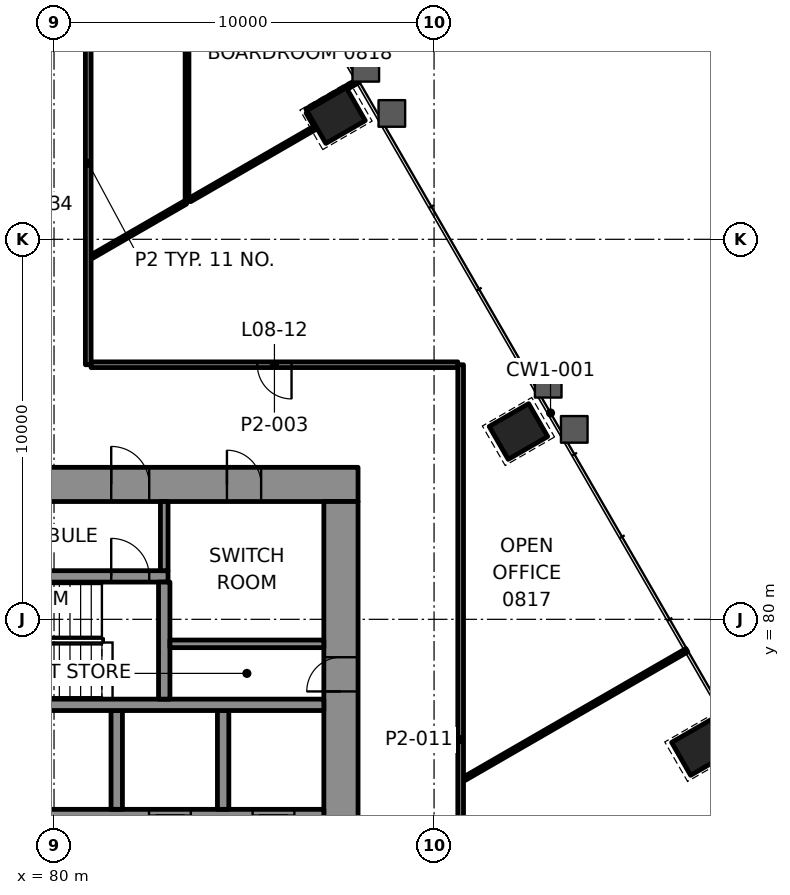
"""IFC4 building model, lengths in metres.
Left out: names, types, materials, properties, quantities, classifications, styles, units other than length and angle.
Written with IfcOpenShell. Run it as: python <this file> out.ifc"""

import sys

from ifc_helpers import new_model, si_unit, direction, frame, frame_2d, origin, origin_2d, place, context, subcontext, project, spatial, rectangle, extrude, element, fill, save


model = new_model("IFC4")
c1 = context("Model", 3, precision=1e-05, world=origin(), true_north=direction((0.0, 1.0)))
c2 = subcontext(c1, "Body", "Model", "MODEL_VIEW")
j1 = project(units=[si_unit("LENGTHUNIT", "METRE"), si_unit("PLANEANGLEUNIT", "RADIAN")], contexts=[c1])
p1 = place(None, origin())
s1 = spatial("IfcSite", under=j1, at=p1, CompositionType="ELEMENT")
p2 = place(p1, origin())
s2 = spatial("IfcBuilding", under=s1, at=p2, CompositionType="ELEMENT")
p3 = place(p2, frame((0.0, 0.0, 40.0)))
s3 = spatial("IfcBuildingStorey", under=s2, at=p3, CompositionType="ELEMENT", Elevation=40.0)
for number, where, z_axis, x_axis in (
    (1, (97.021, 76.628, -0.0), (0.0, 0.0, 1.0), (-0.5, 0.866, 0.0)),
    (2, (92.22, 84.942, -0.0), (0.0, 0.0, 1.0), (-0.5, 0.866, 0.0)),
    (3, (87.421, 93.256, -0.0), (0.0, 0.0, 1.0), (-0.5, 0.866, 0.0)),
):
    element("IfcColumn", number, at=place(p3, frame(where, z_axis=z_axis, x_axis=x_axis)), inside=s3, PredefinedType="COLUMN", context=c2, shape_type="SweptSolid", body=[
        extrude(rectangle(XDim=1.0, YDim=1.2, at=origin_2d()), origin(), (0.0, 0.0, 1.0), 4.2),
    ])
p4 = place(p3, frame((62.0, 83.55, 0.0), z_axis=(0.0, 0.0, 1.0), x_axis=(1.0, 0.0, 0.0)))
e4 = element("IfcWall", 4, at=p4, inside=s3, PredefinedType="SHEAR", context=c2, shape_type="SweptSolid", body=[
    extrude(rectangle(XDim=26.0, YDim=0.9, at=frame_2d((13.0, 0.0))), origin(), (0.0, 0.0, 1.0), 4.0),
])
p5 = place(p4, frame((5.695, 0.0, 0.0)))
e5 = element("IfcOpeningElement", 5, at=p5, cuts=e4, PredefinedType="OPENING", context=c2, shape_type="SweptSolid", body=[
    extrude(rectangle(XDim=1.0, YDim=2.1, at=frame_2d((0.5, 1.05))), frame((0.0, 0.46, 0.0), z_axis=(0.0, -1.0, 0.0), x_axis=(1.0, 0.0, 0.0)), (0.0, 0.0, 1.0), 0.92),
])
p6 = place(p4, frame((19.505, 0.0, 0.0)))
e6 = element("IfcOpeningElement", 6, at=p6, cuts=e4, PredefinedType="OPENING", context=c2, shape_type="SweptSolid", body=[
    extrude(rectangle(XDim=1.0, YDim=2.1, at=frame_2d((0.5, 1.05))), frame((0.0, 0.46, 0.0), z_axis=(0.0, -1.0, 0.0), x_axis=(1.0, 0.0, 0.0)), (0.0, 0.0, 1.0), 0.92),
])
p7 = place(p4, frame((3.45, 0.0, 0.0)))
e7 = element("IfcOpeningElement", 7, at=p7, cuts=e4, PredefinedType="OPENING", context=c2, shape_type="SweptSolid", body=[
    extrude(rectangle(XDim=0.9, YDim=2.1, at=frame_2d((0.45, 1.05))), frame((0.0, 0.46, 0.0), z_axis=(0.0, -1.0, 0.0), x_axis=(1.0, 0.0, 0.0)), (0.0, 0.0, 1.0), 0.92),
])
p8 = place(p4, frame((12.65, 0.0, 0.0)))
e8 = element("IfcOpeningElement", 8, at=p8, cuts=e4, PredefinedType="OPENING", context=c2, shape_type="SweptSolid", body=[
    extrude(rectangle(XDim=0.9, YDim=2.1, at=frame_2d((0.45, 1.05))), frame((0.0, 0.46, 0.0), z_axis=(0.0, -1.0, 0.0), x_axis=(1.0, 0.0, 0.0)), (0.0, 0.0, 1.0), 0.92),
])
p9 = place(p4, frame((22.55, 0.0, 0.0)))
e9 = element("IfcOpeningElement", 9, at=p9, cuts=e4, PredefinedType="OPENING", context=c2, shape_type="SweptSolid", body=[
    extrude(rectangle(XDim=0.9, YDim=2.1, at=frame_2d((0.45, 1.05))), frame((0.0, 0.46, 0.0), z_axis=(0.0, -1.0, 0.0), x_axis=(1.0, 0.0, 0.0)), (0.0, 0.0, 1.0), 0.92),
])
p10 = place(p3, frame((87.55, 66.9, 0.0), z_axis=(0.0, 0.0, 1.0), x_axis=(0.0, 1.0, 0.0)))
e10 = element("IfcWall", 10, at=p10, inside=s3, PredefinedType="SHEAR", context=c2, shape_type="SweptSolid", body=[
    extrude(rectangle(XDim=16.2, YDim=0.9, at=frame_2d((8.1, 0.0))), origin(), (0.0, 0.0, 1.0), 4.0),
])
p11 = place(p10, frame((5.5, 0.0, 0.0)))
e11 = element("IfcOpeningElement", 11, at=p11, cuts=e10, PredefinedType="OPENING", context=c2, shape_type="SweptSolid", body=[
    extrude(rectangle(XDim=1.8, YDim=2.1, at=frame_2d((0.9, 1.05))), frame((0.0, 0.46, 0.0), z_axis=(0.0, -1.0, 0.0), x_axis=(1.0, 0.0, 0.0)), (0.0, 0.0, 1.0), 0.92),
])
p12 = place(p10, frame((11.202, 0.0, 0.0)))
e12 = element("IfcOpeningElement", 12, at=p12, cuts=e10, PredefinedType="OPENING", context=c2, shape_type="SweptSolid", body=[
    extrude(rectangle(XDim=0.9, YDim=2.1, at=frame_2d((0.45, 1.05))), frame((0.0, 0.46, 0.0), z_axis=(0.0, -1.0, 0.0), x_axis=(1.0, 0.0, 0.0)), (0.0, 0.0, 1.0), 0.92),
])
p13 = place(p3, frame((70.3, 74.85, 0.0), z_axis=(0.0, 0.0, 1.0), x_axis=(1.0, 0.0, 0.0)))
e13 = element("IfcWall", 13, at=p13, inside=s3, PredefinedType="SHEAR", context=c2, shape_type="SweptSolid", body=[
    extrude(rectangle(XDim=16.8, YDim=0.3, at=frame_2d((8.4, 0.0))), origin(), (0.0, 0.0, 1.0), 4.0),
])
p14 = place(p13, frame((3.8, 0.0, 0.0)))
e14 = element("IfcOpeningElement", 14, at=p14, cuts=e13, PredefinedType="OPENING", context=c2, shape_type="SweptSolid", body=[
    extrude(rectangle(XDim=1.1, YDim=2.1, at=frame_2d((0.55, 1.05))), frame((0.0, 0.16, 0.0), z_axis=(0.0, -1.0, 0.0), x_axis=(1.0, 0.0, 0.0)), (0.0, 0.0, 1.0), 0.32),
])
p15 = place(p13, frame((12.2, 0.0, 0.0)))
e15 = element("IfcOpeningElement", 15, at=p15, cuts=e13, PredefinedType="OPENING", context=c2, shape_type="SweptSolid", body=[
    extrude(rectangle(XDim=1.1, YDim=2.1, at=frame_2d((0.55, 1.05))), frame((0.0, 0.16, 0.0), z_axis=(0.0, -1.0, 0.0), x_axis=(1.0, 0.0, 0.0)), (0.0, 0.0, 1.0), 0.32),
])
p16 = place(p13, frame((14.925, 0.0, 0.0)))
e16 = element("IfcOpeningElement", 16, at=p16, cuts=e13, PredefinedType="OPENING", context=c2, shape_type="SweptSolid", body=[
    extrude(rectangle(XDim=1.1, YDim=2.1, at=frame_2d((0.55, 1.05))), frame((0.0, 0.16, 0.0), z_axis=(0.0, -1.0, 0.0), x_axis=(1.0, 0.0, 0.0)), (0.0, 0.0, 1.0), 0.32),
])
for number, where, z_axis, x_axis in (
    (17, (81.65, 75.0, 0.0), (0.0, 0.0, 1.0), (0.0, 1.0, 0.0)),
    (18, (84.45, 75.0, 0.0), (0.0, 0.0, 1.0), (0.0, 1.0, 0.0)),
):
    element("IfcWall", number, at=place(p3, frame(where, z_axis=z_axis, x_axis=x_axis)), inside=s3, PredefinedType="SHEAR", context=c2, shape_type="SweptSolid", body=[
        extrude(rectangle(XDim=2.6, YDim=0.3, at=frame_2d((1.3, 0.0))), origin(), (0.0, 0.0, 1.0), 4.0),
    ])
p17 = place(p3, frame((64.35, 77.75, 0.0), z_axis=(0.0, 0.0, 1.0), x_axis=(1.0, 0.0, 0.0)))
e19 = element("IfcWall", 19, at=p17, inside=s3, PredefinedType="SHEAR", context=c2, shape_type="SweptSolid", body=[
    extrude(rectangle(XDim=22.75, YDim=0.3, at=frame_2d((11.375, 0.0))), origin(), (0.0, 0.0, 1.0), 4.0),
])
p18 = place(p17, frame((3.345, 0.0, 0.0)))
e20 = element("IfcOpeningElement", 20, at=p18, cuts=e19, PredefinedType="OPENING", context=c2, shape_type="SweptSolid", body=[
    extrude(rectangle(XDim=1.0, YDim=2.1, at=frame_2d((0.5, 1.05))), frame((0.0, 0.16, 0.0), z_axis=(0.0, -1.0, 0.0), x_axis=(1.0, 0.0, 0.0)), (0.0, 0.0, 1.0), 0.32),
])
p19 = place(p3, frame((76.14, 81.13, 0.0), z_axis=(0.0, 0.0, 1.0), x_axis=(1.0, 0.0, 0.0)))
e21 = element("IfcWall", 21, at=p19, inside=s3, PredefinedType="SHEAR", context=c2, shape_type="SweptSolid", body=[
    extrude(rectangle(XDim=6.86, YDim=0.3, at=frame_2d((3.43, 0.0))), origin(), (0.0, 0.0, 1.0), 4.0),
])
p20 = place(p19, frame((5.365, 0.0, 0.0)))
e22 = element("IfcOpeningElement", 22, at=p20, cuts=e21, PredefinedType="OPENING", context=c2, shape_type="SweptSolid", body=[
    extrude(rectangle(XDim=1.0, YDim=2.1, at=frame_2d((0.5, 1.05))), frame((0.0, 0.16, 0.0), z_axis=(0.0, -1.0, 0.0), x_axis=(1.0, 0.0, 0.0)), (0.0, 0.0, 1.0), 0.32),
])
p21 = place(p3, frame((82.9, 77.9, 0.0), z_axis=(0.0, 0.0, 1.0), x_axis=(0.0, 1.0, 0.0)))
e23 = element("IfcWall", 23, at=p21, inside=s3, PredefinedType="SHEAR", context=c2, shape_type="SweptSolid", body=[
    extrude(rectangle(XDim=3.08, YDim=0.3, at=frame_2d((1.54, 0.0))), origin(), (0.0, 0.0, 1.0), 4.0),
])
p22 = place(p3, frame((90.625, 86.7, 0.0), z_axis=(0.0, 0.0, 1.0), x_axis=(-1.0, 0.0, 0.0)))
e24 = element("IfcWall", 24, at=p22, inside=s3, PredefinedType="PARTITIONING", context=c2, shape_type="SweptSolid", body=[
    extrude(rectangle(XDim=9.649, YDim=0.15, at=frame_2d((4.825, 0.0))), origin(), (0.0, 0.0, 1.0), 3.4),
])
p23 = place(p22, frame((4.375, 0.0, 0.0)))
e25 = element("IfcOpeningElement", 25, at=p23, cuts=e24, PredefinedType="OPENING", context=c2, shape_type="SweptSolid", body=[
    extrude(rectangle(XDim=0.9, YDim=2.1, at=frame_2d((0.45, 1.05))), frame((0.0, 0.085, 0.0), z_axis=(0.0, -1.0, 0.0), x_axis=(1.0, 0.0, 0.0)), (0.0, 0.0, 1.0), 0.17),
])
p24 = place(p3, frame((90.801, 75.809, 0.0), z_axis=(0.0, 0.0, 1.0), x_axis=(0.866012872937, 0.500021703436, 0.0)))
e26 = element("IfcWall", 26, at=p24, inside=s3, PredefinedType="PARTITIONING", context=c2, shape_type="SweptSolid", body=[
    extrude(rectangle(XDim=6.756, YDim=0.1, at=frame_2d((3.378, 0.0))), origin(), (0.0, 0.0, 1.0), 3.165),
])
p25 = place(p3, frame((81.001, 89.55, 0.0), z_axis=(0.0, 0.0, 1.0), x_axis=(0.866019653938, 0.500009958894, 0.0)))
e27 = element("IfcWall", 27, at=p25, inside=s3, PredefinedType="PARTITIONING", context=c2, shape_type="SweptSolid", body=[
    extrude(rectangle(XDim=2.842, YDim=0.1, at=frame_2d((1.421, 0.0))), origin(), (0.0, 0.0, 1.0), 3.4),
])
p26 = place(p3, frame((86.651, 93.389, 0.0), z_axis=(0.0, 0.0, 1.0), x_axis=(0.866018739521, 0.500011542666, 0.0)))
e28 = element("IfcWall", 28, at=p26, inside=s3, PredefinedType="PARTITIONING", context=c2, shape_type="SweptSolid", body=[
    extrude(rectangle(XDim=1.56, YDim=0.1, at=frame_2d((0.78, 0.0))), origin(), (0.0, 0.0, 1.0), 3.165),
])
p27 = place(p3, frame((90.7, 86.699, 0.0), z_axis=(0.0, 0.0, 1.0), x_axis=(0.0, -1.0, 0.0)))
e29 = element("IfcWall", 29, at=p27, inside=s3, PredefinedType="PARTITIONING", context=c2, shape_type="SweptSolid", body=[
    extrude(rectangle(XDim=19.725, YDim=0.15, at=frame_2d((9.862, 0.0))), origin(), (0.0, 0.0, 1.0), 3.4),
])
p28 = place(p27, frame((14.785, 0.0, 0.0)))
e30 = element("IfcOpeningElement", 30, at=p28, cuts=e29, PredefinedType="OPENING", context=c2, shape_type="SweptSolid", body=[
    extrude(rectangle(XDim=0.9, YDim=2.1, at=frame_2d((0.45, 1.05))), frame((0.0, 0.085, 0.0), z_axis=(0.0, -1.0, 0.0), x_axis=(1.0, 0.0, 0.0)), (0.0, 0.0, 1.0), 0.17),
])
p29 = place(p3, frame((83.5, 90.993, 0.0), z_axis=(0.0, 0.0, 1.0), x_axis=(0.0, 1.0, 0.0)))
e31 = element("IfcWall", 31, at=p29, inside=s3, PredefinedType="PARTITIONING", context=c2, shape_type="SweptSolid", body=[
    extrude(rectangle(XDim=8.907, YDim=0.1, at=frame_2d((4.454, 0.0))), origin(), (0.0, 0.0, 1.0), 3.165),
])
p30 = place(p3, frame((80.9, 86.7, 0.0), z_axis=(0.0, 0.0, 1.0), x_axis=(0.0, 1.0, 0.0)))
e32 = element("IfcWall", 32, at=p30, inside=s3, PredefinedType="PARTITIONING", context=c2, shape_type="SweptSolid", body=[
    extrude(rectangle(XDim=10.6, YDim=0.15, at=frame_2d((5.3, 0.0))), origin(), (0.0, 0.0, 1.0), 3.4),
])
p31 = place(p3, frame((86.876, 93.0, 0.0), z_axis=(0.0, 0.0, 1.0), x_axis=(-0.500409926597, 0.865788603161, 0.0)))
e33 = element("IfcWall", 33, at=p31, inside=s3, PredefinedType="PARTITIONING", context=c2, shape_type="SweptSolid", body=[
    extrude(rectangle(XDim=0.4, YDim=0.1, at=frame_2d((0.2, 0.0))), origin(), (0.0, 0.0, 1.0), 3.4),
])
p32 = place(p3, frame((83.575, 91.036, 0.0), z_axis=(0.0, 0.0, 1.0), x_axis=(0.866032607753, 0.499987522153, 0.0)))
e34 = element("IfcWall", 34, at=p32, inside=s3, PredefinedType="PARTITIONING", context=c2, shape_type="SweptSolid", body=[
    extrude(rectangle(XDim=3.8, YDim=0.1, at=frame_2d((1.9, 0.0))), origin(), (0.0, 0.0, 1.0), 3.4),
])
p33 = place(p3, frame((83.05, 79.355, 0.0), z_axis=(0.0, 0.0, 1.0), x_axis=(1.0, 0.0, 0.0)))
e35 = element("IfcWall", 35, at=p33, inside=s3, PredefinedType="PARTITIONING", context=c2, shape_type="SweptSolid", body=[
    extrude(rectangle(XDim=4.05, YDim=0.2, at=frame_2d((2.025, 0.0))), origin(), (0.0, 0.0, 1.0), 4.0),
])
p34 = place(p3, frame((82.9, 81.28, 0.0), z_axis=(0.0, 0.0, 1.0), x_axis=(0.0, 1.0, 0.0)))
e36 = element("IfcWall", 36, at=p34, inside=s3, PredefinedType="PARTITIONING", context=c2, shape_type="SweptSolid", body=[
    extrude(rectangle(XDim=1.82, YDim=0.2, at=frame_2d((0.91, 0.0))), origin(), (0.0, 0.0, 1.0), 4.0),
])
p35 = place(p23, origin())
e37 = element("IfcDoor", 37, at=p35, inside=s3, OperationType="SINGLE_SWING_LEFT", PredefinedType="DOOR", context=c2, shape_type="SweptSolid", body=[
    extrude(rectangle(XDim=0.9, YDim=2.1, at=frame_2d((0.45, 1.05))), frame((0.0, 0.025, 0.0), z_axis=(0.0, -1.0, 0.0), x_axis=(1.0, 0.0, 0.0)), (0.0, 0.0, 1.0), 0.05),
])
fill(e25, e37)
p36 = place(p15, origin())
e38 = element("IfcDoor", 38, at=p36, inside=s3, OperationType="DOUBLE_DOOR_SLIDING", PredefinedType="DOOR", context=c2, shape_type="SweptSolid", body=[
    extrude(rectangle(XDim=1.1, YDim=2.1, at=frame_2d((0.55, 1.05))), frame((0.0, 0.025, 0.0), z_axis=(0.0, -1.0, 0.0), x_axis=(1.0, 0.0, 0.0)), (0.0, 0.0, 1.0), 0.05),
])
fill(e15, e38)
p37 = place(p16, origin())
e39 = element("IfcDoor", 39, at=p37, inside=s3, OperationType="DOUBLE_DOOR_SLIDING", PredefinedType="DOOR", context=c2, shape_type="SweptSolid", body=[
    extrude(rectangle(XDim=1.1, YDim=2.1, at=frame_2d((0.55, 1.05))), frame((0.0, 0.025, 0.0), z_axis=(0.0, -1.0, 0.0), x_axis=(1.0, 0.0, 0.0)), (0.0, 0.0, 1.0), 0.05),
])
fill(e16, e39)
p38 = place(p20, origin())
e40 = element("IfcDoor", 40, at=p38, inside=s3, OperationType="SINGLE_SWING_RIGHT", PredefinedType="DOOR", context=c2, shape_type="SweptSolid", body=[
    extrude(rectangle(XDim=1.0, YDim=2.1, at=frame_2d((0.5, 1.05))), frame((0.0, 0.025, 0.0), z_axis=(0.0, -1.0, 0.0), x_axis=(1.0, 0.0, 0.0)), (0.0, 0.0, 1.0), 0.05),
])
fill(e22, e40)
p39 = place(p6, origin())
e41 = element("IfcDoor", 41, at=p39, inside=s3, OperationType="SINGLE_SWING_LEFT", PredefinedType="DOOR", context=c2, shape_type="SweptSolid", body=[
    extrude(rectangle(XDim=1.0, YDim=2.1, at=frame_2d((0.5, 1.05))), frame((0.0, 0.17, 0.0), z_axis=(0.0, -1.0, 0.0), x_axis=(1.0, 0.0, 0.0)), (0.0, 0.0, 1.0), 0.34),
])
fill(e6, e41)
p40 = place(p12, origin())
e42 = element("IfcDoor", 42, at=p40, inside=s3, OperationType="SINGLE_SWING_RIGHT", PredefinedType="DOOR", context=c2, shape_type="SweptSolid", body=[
    extrude(rectangle(XDim=0.9, YDim=2.1, at=frame_2d((0.45, 1.05))), frame((0.0, 0.17, 0.0), z_axis=(0.0, -1.0, 0.0), x_axis=(1.0, 0.0, 0.0)), (0.0, 0.0, 1.0), 0.34),
])
fill(e12, e42)
p41 = place(p9, origin())
e43 = element("IfcDoor", 43, at=p41, inside=s3, OperationType="SINGLE_SWING_LEFT", PredefinedType="DOOR", context=c2, shape_type="SweptSolid", body=[
    extrude(rectangle(XDim=0.9, YDim=2.1, at=frame_2d((0.45, 1.05))), frame((0.0, 0.17, 0.0), z_axis=(0.0, -1.0, 0.0), x_axis=(1.0, 0.0, 0.0)), (0.0, 0.0, 1.0), 0.34),
])
fill(e9, e43)
save(model, sys.argv[1])
